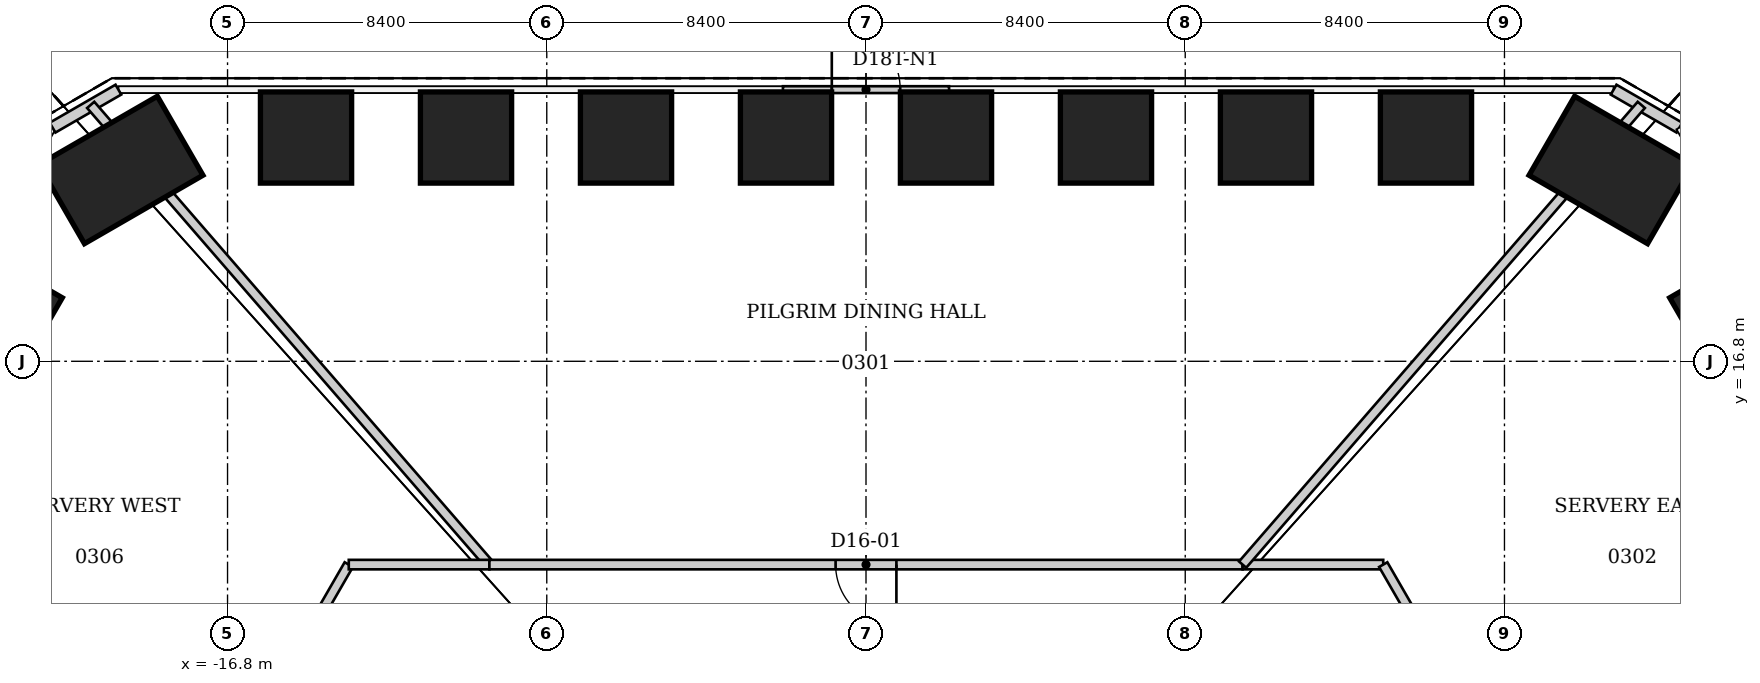
"""IFC4 building model, lengths in metres.
Left out: names, types, materials, properties, quantities, classifications, styles, units other than length and angle.
Written with IfcOpenShell. Run it as: python <this file> out.ifc"""

import sys

from ifc_helpers import new_model, si_unit, direction, frame, frame_2d, origin, origin_2d, place, context, subcontext, project, spatial, rectangle, extrude, element, fill, save


model = new_model("IFC4")
c1 = context("Model", 3, precision=1e-05, world=origin(), true_north=direction((0.0, 1.0)))
c2 = subcontext(c1, "Body", "Model", "MODEL_VIEW")
j1 = project(units=[si_unit("LENGTHUNIT", "METRE"), si_unit("PLANEANGLEUNIT", "RADIAN")], contexts=[c1])
p1 = place(None, origin())
s1 = spatial("IfcSite", under=j1, at=p1, CompositionType="ELEMENT")
p2 = place(p1, origin())
s2 = spatial("IfcBuilding", under=s1, at=p2, CompositionType="ELEMENT")
p3 = place(p2, frame((0.0, 0.0, 18.0)))
s3 = spatial("IfcBuildingStorey", under=s2, at=p3, CompositionType="ELEMENT", Elevation=18.0)
for number, where, z_axis, x_axis in (
    (1, (-14.735, 22.689, 0.0), (0.0, 0.0, 1.0), (0.0, 1.0, 0.0)),
    (2, (-10.525, 22.689, 0.0), (0.0, 0.0, 1.0), (0.0, 1.0, 0.0)),
    (3, (-6.315, 22.689, 0.0), (0.0, 0.0, 1.0), (0.0, 1.0, 0.0)),
    (4, (-2.105, 22.689, 0.0), (0.0, 0.0, 1.0), (0.0, 1.0, 0.0)),
    (5, (2.105, 22.689, 0.0), (0.0, 0.0, 1.0), (0.0, 1.0, 0.0)),
    (6, (6.315, 22.689, 0.0), (0.0, 0.0, 1.0), (0.0, 1.0, 0.0)),
    (7, (10.525, 22.689, 0.0), (0.0, 0.0, 1.0), (0.0, 1.0, 0.0)),
    (8, (14.735, 22.689, 0.0), (0.0, 0.0, 1.0), (0.0, 1.0, 0.0)),
):
    element("IfcColumn", number, at=place(p3, frame(where, z_axis=z_axis, x_axis=x_axis)), inside=s3, PredefinedType="COLUMN", context=c2, shape_type="SweptSolid", body=[
        extrude(rectangle(XDim=2.4, YDim=2.4, at=origin_2d()), origin(), (0.0, 0.0, 1.0), 5.0),
    ])
p4 = place(p3, frame((19.606, 21.835, 0.0), z_axis=(0.0, 0.0, 1.0), x_axis=(0.5, 0.866025403784, 0.0)))
e9 = element("IfcColumn", 9, at=p4, inside=s3, PredefinedType="COLUMN", context=c2, shape_type="SweptSolid", body=[
    extrude(rectangle(XDim=2.4, YDim=3.6, at=origin_2d()), origin(), (0.0, 0.0, 1.0), 5.0),
])
for number, where, z_axis, x_axis in (
    (10, (22.788, 18.032, 0.0), (0.0, 0.0, 1.0), (0.866, 0.5, 0.0)),
    (11, (-22.788, 18.032, 0.0), (0.0, 0.0, 1.0), (-0.866, 0.5, 0.0)),
):
    element("IfcColumn", number, at=place(p3, frame(where, z_axis=z_axis, x_axis=x_axis)), inside=s3, PredefinedType="COLUMN", context=c2, shape_type="SweptSolid", body=[
        extrude(rectangle(XDim=2.4, YDim=2.4, at=origin_2d()), origin(), (0.0, 0.0, 1.0), 5.0),
    ])
p5 = place(p3, frame((-19.606, 21.835, 0.0), z_axis=(0.0, 0.0, 1.0), x_axis=(-0.5, 0.866025403784, 0.0)))
e12 = element("IfcColumn", 12, at=p5, inside=s3, PredefinedType="COLUMN", context=c2, shape_type="SweptSolid", body=[
    extrude(rectangle(XDim=2.4, YDim=3.6, at=origin_2d()), origin(), (0.0, 0.0, 1.0), 5.0),
])
p6 = place(p3, frame((-2.186, 23.949, 0.0), z_axis=(0.0, 0.0, 1.0), x_axis=(1.0, 0.0, 0.0)))
e13 = element("IfcWall", 13, at=p6, inside=s3, PredefinedType="SOLIDWALL", context=c2, shape_type="SweptSolid", body=[
    extrude(rectangle(XDim=4.372, YDim=0.18, at=frame_2d((2.186, 0.0))), origin(), (0.0, 0.0, 1.0), 4.84),
])
p7 = place(p6, frame((1.286, 0.0, 0.0)))
e14 = element("IfcOpeningElement", 14, at=p7, cuts=e13, PredefinedType="OPENING", context=c2, shape_type="SweptSolid", body=[
    extrude(rectangle(XDim=1.8, YDim=2.4, at=frame_2d((0.9, 1.2))), frame((0.0, 0.09, 0.0), z_axis=(0.0, -1.0, 0.0), x_axis=(1.0, 0.0, 0.0)), (0.0, 0.0, 1.0), 0.18),
])
for number, where, z_axis, x_axis in (
    (15, (19.672, 23.949, 0.0), (0.0, 0.0, 1.0), (0.866, -0.5, 0.0)),
    (16, (-21.404, 22.949, 0.0), (0.0, 0.0, 1.0), (0.866, 0.5, 0.0)),
):
    element("IfcWall", number, at=place(p3, frame(where, z_axis=z_axis, x_axis=x_axis)), inside=s3, PredefinedType="SOLIDWALL", context=c2, shape_type="SweptSolid", body=[
        extrude(rectangle(XDim=2.0, YDim=0.3, at=frame_2d((1.0, 0.0))), origin(), (0.0, 0.0, 1.0), 4.84),
    ])
p8 = place(p3, frame((-13.61, 11.45, 0.0), z_axis=(0.0, 0.0, 1.0), x_axis=(-0.499759814377, -0.866164030617, 0.0)))
e17 = element("IfcWall", 17, at=p8, inside=s3, PredefinedType="PARTITIONING", context=c2, shape_type="SweptSolid", body=[
    extrude(rectangle(XDim=6.223, YDim=0.25, at=frame_2d((3.111, 0.0))), origin(), (0.0, 0.0, 1.0), 4.84),
])
p9 = place(p8, frame((2.312, 0.0, 0.0)))
e18 = element("IfcOpeningElement", 18, at=p9, cuts=e17, PredefinedType="OPENING", context=c2, shape_type="SweptSolid", body=[
    extrude(rectangle(XDim=1.6, YDim=2.4, at=frame_2d((0.8, 1.2))), frame((0.0, 0.125, 0.0), z_axis=(0.0, -1.0, 0.0), x_axis=(1.0, 0.0, 0.0)), (0.0, 0.0, 1.0), 0.25),
])
p10 = place(p3, frame((-9.91, 11.45, 0.0), z_axis=(0.0, 0.0, 1.0), x_axis=(-0.655146445725, 0.7555019091, 0.0)))
e19 = element("IfcWall", 19, at=p10, inside=s3, PredefinedType="PARTITIONING", context=c2, shape_type="SweptSolid", body=[
    extrude(rectangle(XDim=16.012, YDim=0.25, at=frame_2d((8.006, 0.0))), origin(), (0.0, 0.0, 1.0), 4.84),
])
p11 = place(p3, frame((-9.91, 11.45, 0.0), z_axis=(0.0, 0.0, 1.0), x_axis=(-1.0, 0.0, 0.0)))
e20 = element("IfcWall", 20, at=p11, inside=s3, PredefinedType="PARTITIONING", context=c2, shape_type="SweptSolid", body=[
    extrude(rectangle(XDim=3.7, YDim=0.25, at=frame_2d((1.85, 0.0))), origin(), (0.0, 0.0, 1.0), 4.84),
])
p12 = place(p3, frame((9.91, 11.45, 0.0), z_axis=(0.0, 0.0, 1.0), x_axis=(-1.0, 0.0, 0.0)))
e21 = element("IfcWall", 21, at=p12, inside=s3, PredefinedType="PARTITIONING", context=c2, shape_type="SweptSolid", body=[
    extrude(rectangle(XDim=19.82, YDim=0.25, at=frame_2d((9.91, 0.0))), origin(), (0.0, 0.0, 1.0), 4.84),
])
p13 = place(p12, frame((9.11, 0.0, 0.0)))
e22 = element("IfcOpeningElement", 22, at=p13, cuts=e21, PredefinedType="OPENING", context=c2, shape_type="SweptSolid", body=[
    extrude(rectangle(XDim=1.6, YDim=2.4, at=frame_2d((0.8, 1.2))), frame((0.0, 0.125, 0.0), z_axis=(0.0, -1.0, 0.0), x_axis=(1.0, 0.0, 0.0)), (0.0, 0.0, 1.0), 0.25),
])
p14 = place(p3, frame((13.61, 11.45, 0.0), z_axis=(0.0, 0.0, 1.0), x_axis=(-1.0, 0.0, 0.0)))
e23 = element("IfcWall", 23, at=p14, inside=s3, PredefinedType="PARTITIONING", context=c2, shape_type="SweptSolid", body=[
    extrude(rectangle(XDim=3.7, YDim=0.25, at=frame_2d((1.85, 0.0))), origin(), (0.0, 0.0, 1.0), 4.84),
])
p15 = place(p3, frame((16.72, 6.06, 0.0), z_axis=(0.0, 0.0, 1.0), x_axis=(-0.499759814377, 0.866164030617, 0.0)))
e24 = element("IfcWall", 24, at=p15, inside=s3, PredefinedType="PARTITIONING", context=c2, shape_type="SweptSolid", body=[
    extrude(rectangle(XDim=6.223, YDim=0.25, at=frame_2d((3.111, 0.0))), origin(), (0.0, 0.0, 1.0), 4.84),
])
p16 = place(p15, frame((2.312, 0.0, 0.0)))
e25 = element("IfcOpeningElement", 25, at=p16, cuts=e24, PredefinedType="OPENING", context=c2, shape_type="SweptSolid", body=[
    extrude(rectangle(XDim=1.6, YDim=2.4, at=frame_2d((0.8, 1.2))), frame((0.0, 0.125, 0.0), z_axis=(0.0, -1.0, 0.0), x_axis=(1.0, 0.0, 0.0)), (0.0, 0.0, 1.0), 0.25),
])
p17 = place(p3, frame((20.4, 23.547, 0.0), z_axis=(0.0, 0.0, 1.0), x_axis=(-0.655146445725, -0.7555019091, 0.0)))
e26 = element("IfcWall", 26, at=p17, inside=s3, PredefinedType="PARTITIONING", context=c2, shape_type="SweptSolid", body=[
    extrude(rectangle(XDim=16.012, YDim=0.25, at=frame_2d((8.006, 0.0))), origin(), (0.0, 0.0, 1.0), 4.84),
])
p18 = place(p7, origin())
e27 = element("IfcDoor", 27, at=p18, inside=s3, OperationType="SINGLE_SWING_LEFT", PredefinedType="DOOR", context=c2, shape_type="SweptSolid", body=[
    extrude(rectangle(XDim=1.8, YDim=2.4, at=frame_2d((0.9, 1.2))), frame((0.0, 0.025, 0.0), z_axis=(0.0, -1.0, 0.0), x_axis=(1.0, 0.0, 0.0)), (0.0, 0.0, 1.0), 0.05),
])
fill(e14, e27)
p19 = place(p13, origin())
e28 = element("IfcDoor", 28, at=p19, inside=s3, OperationType="DOUBLE_DOOR_SINGLE_SWING", PredefinedType="DOOR", context=c2, shape_type="SweptSolid", body=[
    extrude(rectangle(XDim=1.6, YDim=2.4, at=frame_2d((0.8, 1.2))), frame((0.0, 0.025, 0.0), z_axis=(0.0, -1.0, 0.0), x_axis=(1.0, 0.0, 0.0)), (0.0, 0.0, 1.0), 0.05),
])
fill(e22, e28)
save(model, sys.argv[1])
